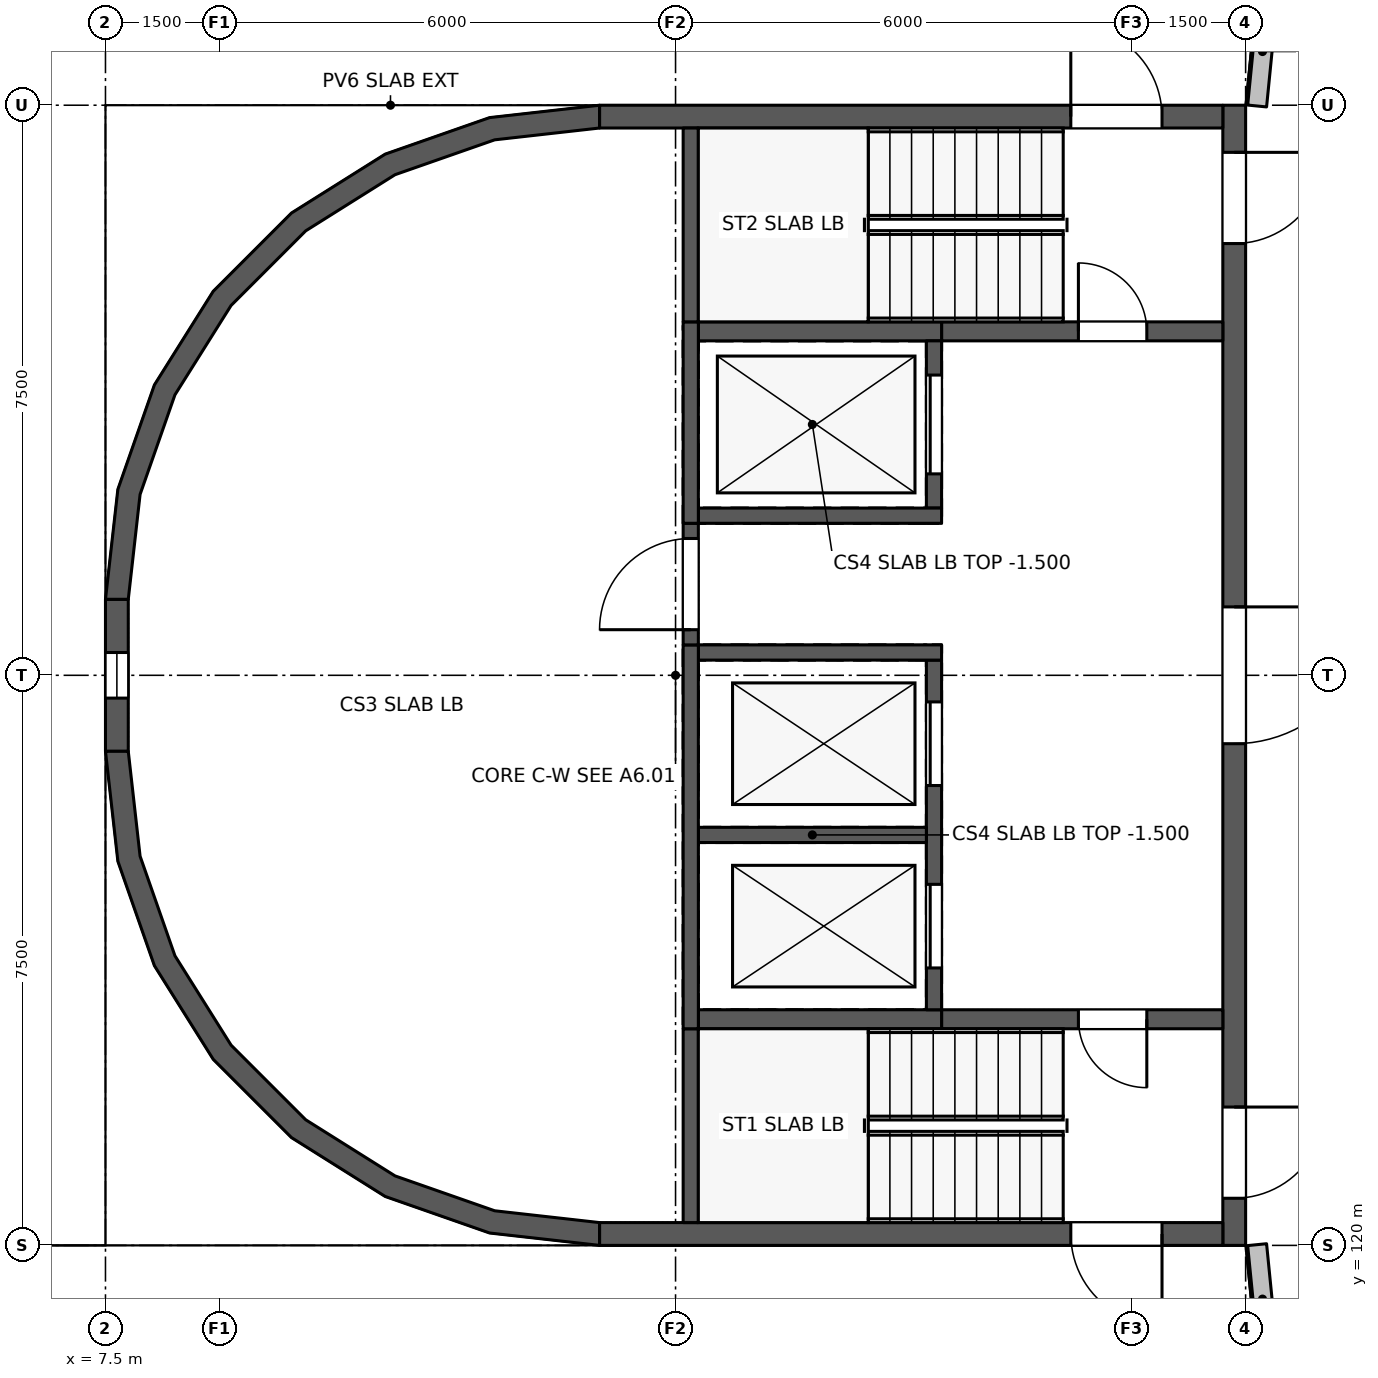
"""IFC4 building model, lengths in metres.
Left out: names, types, materials, properties, quantities, classifications, styles, units other than length and angle.
Written with IfcOpenShell. Run it as: python <this file> out.ifc"""

import sys

from ifc_helpers import new_model, si_unit, direction, frame, frame_2d, origin, place, context, subcontext, project, spatial, polyline, rectangle, outline, extrude, element, fill, save


model = new_model("IFC4")
c1 = context("Model", 3, precision=1e-05, world=origin(), true_north=direction((0.0, 1.0)))
c2 = subcontext(c1, "Body", "Model", "MODEL_VIEW")
j1 = project(units=[si_unit("LENGTHUNIT", "METRE"), si_unit("PLANEANGLEUNIT", "RADIAN")], contexts=[c1])
p1 = place(None, origin())
s1 = spatial("IfcSite", under=j1, at=p1, CompositionType="ELEMENT")
p2 = place(p1, origin())
s2 = spatial("IfcBuilding", under=s1, at=p2, CompositionType="ELEMENT")
p3 = place(p2, origin())
s3 = spatial("IfcBuildingStorey", under=s2, at=p3, CompositionType="ELEMENT", Elevation=0.0)
p4 = place(p3, frame((22.793, 136.423, 0.0), z_axis=(0.0, 0.0, 1.0), x_axis=(-0.098647801521, -0.995122410186, 0.0)))
e1 = element("IfcWall", 1, at=p4, inside=s3, PredefinedType="SOLIDWALL", context=c2, shape_type="SweptSolid", body=[
    extrude(rectangle(XDim=1.44, YDim=0.25, at=frame_2d((0.72, 0.0))), origin(), (0.0, 0.0, 1.0), 1.1),
])
p5 = place(p3, frame((22.651, 120.01, 0.0), z_axis=(0.0, 0.0, 1.0), x_axis=(0.098664443357, -0.995120760319, 0.0)))
e2 = element("IfcWall", 2, at=p5, inside=s3, PredefinedType="SOLIDWALL", context=c2, shape_type="SweptSolid", body=[
    extrude(rectangle(XDim=1.44, YDim=0.25, at=frame_2d((0.72, 0.0))), origin(), (0.0, 0.0, 1.0), 1.1),
])
p6 = place(p3, frame((22.35, 135.0, 0.0), z_axis=(0.0, 0.0, 1.0), x_axis=(0.0, -1.0, 0.0)))
e3 = element("IfcWall", 3, at=p6, inside=s3, PredefinedType="SHEAR", context=c2, shape_type="SweptSolid", body=[
    extrude(rectangle(XDim=15.0, YDim=0.3, at=frame_2d((7.5, 0.0))), origin(), (0.0, 0.0, 1.0), 3.3),
])
p7 = place(p6, frame((13.18, 0.0, 0.0)))
e4 = element("IfcOpeningElement", 4, at=p7, cuts=e3, PredefinedType="OPENING", context=c2, shape_type="SweptSolid", body=[
    extrude(rectangle(XDim=1.2, YDim=2.1, at=frame_2d((0.6, 1.05))), frame((0.0, 0.16, 0.0), z_axis=(0.0, -1.0, 0.0), x_axis=(1.0, 0.0, 0.0)), (0.0, 0.0, 1.0), 0.32),
])
p8 = place(p6, frame((0.62, 0.0, 0.0)))
e5 = element("IfcOpeningElement", 5, at=p8, cuts=e3, PredefinedType="OPENING", context=c2, shape_type="SweptSolid", body=[
    extrude(rectangle(XDim=1.2, YDim=2.1, at=frame_2d((0.6, 1.05))), frame((0.0, 0.16, 0.0), z_axis=(0.0, -1.0, 0.0), x_axis=(1.0, 0.0, 0.0)), (0.0, 0.0, 1.0), 0.32),
])
p9 = place(p6, frame((6.6, 0.0, 0.0)))
e6 = element("IfcOpeningElement", 6, at=p9, cuts=e3, PredefinedType="OPENING", context=c2, shape_type="SweptSolid", body=[
    extrude(rectangle(XDim=1.8, YDim=2.1, at=frame_2d((0.9, 1.05))), frame((0.0, 0.16, 0.0), z_axis=(0.0, -1.0, 0.0), x_axis=(1.0, 0.0, 0.0)), (0.0, 0.0, 1.0), 0.32),
])
p10 = place(p3, frame((7.65, 126.5, 0.0), z_axis=(0.0, 0.0, 1.0), x_axis=(0.0, 1.0, 0.0)))
e7 = element("IfcWall", 7, at=p10, inside=s3, PredefinedType="SHEAR", context=c2, shape_type="SweptSolid", body=[
    extrude(rectangle(XDim=2.0, YDim=0.3, at=frame_2d((1.0, 0.0))), origin(), (0.0, 0.0, 1.0), 3.3),
])
p11 = place(p10, frame((0.7, 0.0, 0.3)))
e8 = element("IfcOpeningElement", 8, at=p11, cuts=e7, PredefinedType="OPENING", context=c2, shape_type="SweptSolid", body=[
    extrude(rectangle(XDim=0.6, YDim=2.7, at=frame_2d((0.3, 1.35))), frame((0.0, 0.16, 0.0), z_axis=(0.0, -1.0, 0.0), x_axis=(1.0, 0.0, 0.0)), (0.0, 0.0, 1.0), 0.32),
])
p12 = place(p3, frame((22.2, 120.15, 0.0), z_axis=(0.0, 0.0, 1.0), x_axis=(-1.0, 0.0, 0.0)))
e9 = element("IfcWall", 9, at=p12, inside=s3, PredefinedType="SHEAR", context=c2, shape_type="SweptSolid", body=[
    extrude(rectangle(XDim=8.2, YDim=0.3, at=frame_2d((4.1, 0.0))), origin(), (0.0, 0.0, 1.0), 3.3),
])
p13 = place(p12, frame((0.8, 0.0, 0.0)))
e10 = element("IfcOpeningElement", 10, at=p13, cuts=e9, PredefinedType="OPENING", context=c2, shape_type="SweptSolid", body=[
    extrude(rectangle(XDim=1.2, YDim=2.1, at=frame_2d((0.6, 1.05))), frame((0.0, 0.16, 0.0), z_axis=(0.0, -1.0, 0.0), x_axis=(1.0, 0.0, 0.0)), (0.0, 0.0, 1.0), 0.32),
])
p14 = place(p3, frame((14.0, 134.85, 0.0), z_axis=(0.0, 0.0, 1.0), x_axis=(1.0, 0.0, 0.0)))
e11 = element("IfcWall", 11, at=p14, inside=s3, PredefinedType="SHEAR", context=c2, shape_type="SweptSolid", body=[
    extrude(rectangle(XDim=8.2, YDim=0.3, at=frame_2d((4.1, 0.0))), origin(), (0.0, 0.0, 1.0), 3.3),
])
p15 = place(p14, frame((6.2, 0.0, 0.0)))
e12 = element("IfcOpeningElement", 12, at=p15, cuts=e11, PredefinedType="OPENING", context=c2, shape_type="SweptSolid", body=[
    extrude(rectangle(XDim=1.2, YDim=2.1, at=frame_2d((0.6, 1.05))), frame((0.0, 0.16, 0.0), z_axis=(0.0, -1.0, 0.0), x_axis=(1.0, 0.0, 0.0)), (0.0, 0.0, 1.0), 0.32),
])
p16 = place(p3, frame((22.2, 122.975, 0.0), z_axis=(0.0, 0.0, 1.0), x_axis=(-1.0, 0.0, 0.0)))
e13 = element("IfcWall", 13, at=p16, inside=s3, PredefinedType="STANDARD", context=c2, shape_type="SweptSolid", body=[
    extrude(rectangle(XDim=3.7, YDim=0.25, at=frame_2d((1.85, 0.0))), origin(), (0.0, 0.0, 1.0), 3.1),
])
p17 = place(p16, frame((1.0, 0.0, 0.0)))
e14 = element("IfcOpeningElement", 14, at=p17, cuts=e13, PredefinedType="OPENING", context=c2, shape_type="SweptSolid", body=[
    extrude(rectangle(XDim=0.9, YDim=2.1, at=frame_2d((0.45, 1.05))), frame((0.0, 0.135, 0.0), z_axis=(0.0, -1.0, 0.0), x_axis=(1.0, 0.0, 0.0)), (0.0, 0.0, 1.0), 0.27),
])
p18 = place(p3, frame((18.5, 122.975, 0.0), z_axis=(0.0, 0.0, 1.0), x_axis=(-1.0, 0.0, 0.0)))
e15 = element("IfcWall", 15, at=p18, inside=s3, PredefinedType="STANDARD", context=c2, shape_type="SweptSolid", body=[
    extrude(rectangle(XDim=3.2, YDim=0.25, at=frame_2d((1.6, 0.0))), origin(), (0.0, 0.0, 1.0), 3.1),
])
p19 = place(p3, frame((18.5, 132.025, 0.0), z_axis=(0.0, 0.0, 1.0), x_axis=(1.0, 0.0, 0.0)))
e16 = element("IfcWall", 16, at=p19, inside=s3, PredefinedType="STANDARD", context=c2, shape_type="SweptSolid", body=[
    extrude(rectangle(XDim=3.7, YDim=0.25, at=frame_2d((1.85, 0.0))), origin(), (0.0, 0.0, 1.0), 3.1),
])
p20 = place(p19, frame((1.8, 0.0, 0.0)))
e17 = element("IfcOpeningElement", 17, at=p20, cuts=e16, PredefinedType="OPENING", context=c2, shape_type="SweptSolid", body=[
    extrude(rectangle(XDim=0.9, YDim=2.1, at=frame_2d((0.45, 1.05))), frame((0.0, 0.135, 0.0), z_axis=(0.0, -1.0, 0.0), x_axis=(1.0, 0.0, 0.0)), (0.0, 0.0, 1.0), 0.27),
])
p21 = place(p3, frame((18.5, 132.025, 0.0), z_axis=(0.0, 0.0, 1.0), x_axis=(-1.0, 0.0, 0.0)))
e18 = element("IfcWall", 18, at=p21, inside=s3, PredefinedType="STANDARD", context=c2, shape_type="SweptSolid", body=[
    extrude(rectangle(XDim=3.2, YDim=0.25, at=frame_2d((1.6, 0.0))), origin(), (0.0, 0.0, 1.0), 3.1),
])
p22 = place(p3, frame((18.4, 123.1, 0.0), z_axis=(0.0, 0.0, 1.0), x_axis=(0.0, 1.0, 0.0)))
e19 = element("IfcWall", 19, at=p22, inside=s3, PredefinedType="STANDARD", context=c2, shape_type="SweptSolid", body=[
    extrude(rectangle(XDim=4.6, YDim=0.2, at=frame_2d((2.3, 0.0))), origin(), (0.0, 0.0, 1.0), 3.1),
])
p23 = place(p22, frame((0.55, 0.0, 0.0)))
e20 = element("IfcOpeningElement", 20, at=p23, cuts=e19, PredefinedType="OPENING", context=c2, shape_type="SweptSolid", body=[
    extrude(rectangle(XDim=1.1, YDim=2.1, at=frame_2d((0.55, 1.05))), frame((0.0, 0.11, 0.0), z_axis=(0.0, -1.0, 0.0), x_axis=(1.0, 0.0, 0.0)), (0.0, 0.0, 1.0), 0.22),
])
p24 = place(p22, frame((2.95, 0.0, 0.0)))
e21 = element("IfcOpeningElement", 21, at=p24, cuts=e19, PredefinedType="OPENING", context=c2, shape_type="SweptSolid", body=[
    extrude(rectangle(XDim=1.1, YDim=2.1, at=frame_2d((0.55, 1.05))), frame((0.0, 0.11, 0.0), z_axis=(0.0, -1.0, 0.0), x_axis=(1.0, 0.0, 0.0)), (0.0, 0.0, 1.0), 0.22),
])
p25 = place(p3, frame((18.4, 129.7, 0.0), z_axis=(0.0, 0.0, 1.0), x_axis=(0.0, 1.0, 0.0)))
e22 = element("IfcWall", 22, at=p25, inside=s3, PredefinedType="STANDARD", context=c2, shape_type="SweptSolid", body=[
    extrude(rectangle(XDim=2.2, YDim=0.2, at=frame_2d((1.1, 0.0))), origin(), (0.0, 0.0, 1.0), 3.1),
])
p26 = place(p25, frame((0.45, 0.0, 0.0)))
e23 = element("IfcOpeningElement", 23, at=p26, cuts=e22, PredefinedType="OPENING", context=c2, shape_type="SweptSolid", body=[
    extrude(rectangle(XDim=1.3, YDim=2.1, at=frame_2d((0.65, 1.05))), frame((0.0, 0.11, 0.0), z_axis=(0.0, -1.0, 0.0), x_axis=(1.0, 0.0, 0.0)), (0.0, 0.0, 1.0), 0.22),
])
p27 = place(p3, frame((18.3, 125.4, 0.0), z_axis=(0.0, 0.0, 1.0), x_axis=(-1.0, 0.0, 0.0)))
e24 = element("IfcWall", 24, at=p27, inside=s3, PredefinedType="STANDARD", context=c2, shape_type="SweptSolid", body=[
    extrude(rectangle(XDim=3.0, YDim=0.2, at=frame_2d((1.5, 0.0))), origin(), (0.0, 0.0, 1.0), 3.1),
])
for number, where, z_axis, x_axis in (
    (25, (18.5, 127.8, 0.0), (0.0, 0.0, 1.0), (-1.0, 0.0, 0.0)),
    (26, (18.5, 129.6, 0.0), (0.0, 0.0, 1.0), (-1.0, 0.0, 0.0)),
):
    element("IfcWall", number, at=place(p3, frame(where, z_axis=z_axis, x_axis=x_axis)), inside=s3, PredefinedType="STANDARD", context=c2, shape_type="SweptSolid", body=[
        extrude(rectangle(XDim=3.2, YDim=0.2, at=frame_2d((1.6, 0.0))), origin(), (0.0, 0.0, 1.0), 3.1),
    ])
p28 = place(p3, frame((15.2, 120.3, 0.0), z_axis=(0.0, 0.0, 1.0), x_axis=(0.0, 1.0, 0.0)))
e27 = element("IfcWall", 27, at=p28, inside=s3, PredefinedType="STANDARD", context=c2, shape_type="SweptSolid", body=[
    extrude(rectangle(XDim=2.55, YDim=0.2, at=frame_2d((1.275, 0.0))), origin(), (0.0, 0.0, 1.0), 3.1),
])
p29 = place(p3, frame((15.2, 122.85, 0.0), z_axis=(0.0, 0.0, 1.0), x_axis=(0.0, 1.0, 0.0)))
e28 = element("IfcWall", 28, at=p29, inside=s3, PredefinedType="STANDARD", context=c2, shape_type="SweptSolid", body=[
    extrude(rectangle(XDim=5.05, YDim=0.2, at=frame_2d((2.525, 0.0))), origin(), (0.0, 0.0, 1.0), 3.1),
])
p30 = place(p3, frame((15.2, 127.9, 0.0), z_axis=(0.0, 0.0, 1.0), x_axis=(0.0, 1.0, 0.0)))
e29 = element("IfcWall", 29, at=p30, inside=s3, PredefinedType="STANDARD", context=c2, shape_type="SweptSolid", body=[
    extrude(rectangle(XDim=1.6, YDim=0.2, at=frame_2d((0.8, 0.0))), origin(), (0.0, 0.0, 1.0), 3.1),
])
p31 = place(p30, frame((0.2, 0.0, 0.0)))
e30 = element("IfcOpeningElement", 30, at=p31, cuts=e29, PredefinedType="OPENING", context=c2, shape_type="SweptSolid", body=[
    extrude(rectangle(XDim=1.2, YDim=2.1, at=frame_2d((0.6, 1.05))), frame((0.0, 0.11, 0.0), z_axis=(0.0, -1.0, 0.0), x_axis=(1.0, 0.0, 0.0)), (0.0, 0.0, 1.0), 0.22),
])
p32 = place(p3, frame((15.2, 129.5, 0.0), z_axis=(0.0, 0.0, 1.0), x_axis=(0.0, 1.0, 0.0)))
e31 = element("IfcWall", 31, at=p32, inside=s3, PredefinedType="STANDARD", context=c2, shape_type="SweptSolid", body=[
    extrude(rectangle(XDim=2.65, YDim=0.2, at=frame_2d((1.325, 0.0))), origin(), (0.0, 0.0, 1.0), 3.1),
])
p33 = place(p3, frame((15.2, 132.15, 0.0), z_axis=(0.0, 0.0, 1.0), x_axis=(0.0, 1.0, 0.0)))
e32 = element("IfcWall", 32, at=p33, inside=s3, PredefinedType="STANDARD", context=c2, shape_type="SweptSolid", body=[
    extrude(rectangle(XDim=2.55, YDim=0.2, at=frame_2d((1.275, 0.0))), origin(), (0.0, 0.0, 1.0), 3.1),
])
p34 = place(p3, origin())
e33 = element("IfcWall", 33, at=p34, inside=s3, PredefinedType="SHEAR", context=c2, shape_type="SweptSolid", body=[
    extrude(outline(polyline([(14.0, 120.0), (12.554, 120.163), (11.18, 120.644), (9.947, 121.418), (8.918, 122.447), (8.144, 123.68), (7.663, 125.054), (7.5, 126.5), (7.8, 126.5), (7.955, 125.12), (8.414, 123.81), (9.153, 122.635), (10.135, 121.653), (11.31, 120.914), (12.62, 120.455), (14.0, 120.3), (14.0, 120.0)])), origin(), (0.0, 0.0, 1.0), 3.3),
])
p35 = place(p3, origin())
e34 = element("IfcWall", 34, at=p35, inside=s3, PredefinedType="SHEAR", context=c2, shape_type="SweptSolid", body=[
    extrude(outline(polyline([(14.0, 135.0), (12.554, 134.837), (11.18, 134.356), (9.947, 133.582), (8.918, 132.553), (8.144, 131.32), (7.663, 129.946), (7.5, 128.5), (7.8, 128.5), (7.955, 129.88), (8.414, 131.19), (9.153, 132.365), (10.135, 133.347), (11.31, 134.086), (12.62, 134.545), (14.0, 134.7), (14.0, 135.0)])), origin(), (0.0, 0.0, 1.0), 3.3),
])
p36 = place(p3, frame((18.4, 122.9, -1.5), z_axis=(0.0, 0.0, 1.0), x_axis=(0.0, 1.0, 0.0)))
e35 = element("IfcWall", 35, at=p36, inside=s3, PredefinedType="STANDARD", context=c2, shape_type="SweptSolid", body=[
    extrude(rectangle(XDim=5.0, YDim=0.2, at=frame_2d((2.5, 0.0))), origin(), (0.0, 0.0, 1.0), 1.3),
])
for number, where, z_axis, x_axis in (
    (36, (18.3, 123.0, -1.5), (0.0, 0.0, 1.0), (-1.0, 0.0, 0.0)),
    (37, (18.3, 125.4, -1.5), (0.0, 0.0, 1.0), (-1.0, 0.0, 0.0)),
    (38, (18.3, 127.8, -1.5), (0.0, 0.0, 1.0), (-1.0, 0.0, 0.0)),
):
    element("IfcWall", number, at=place(p3, frame(where, z_axis=z_axis, x_axis=x_axis)), inside=s3, PredefinedType="STANDARD", context=c2, shape_type="SweptSolid", body=[
        extrude(rectangle(XDim=3.0, YDim=0.2, at=frame_2d((1.5, 0.0))), origin(), (0.0, 0.0, 1.0), 1.3),
    ])
p37 = place(p3, frame((15.2, 122.9, -1.5), z_axis=(0.0, 0.0, 1.0), x_axis=(0.0, 1.0, 0.0)))
e39 = element("IfcWall", 39, at=p37, inside=s3, PredefinedType="STANDARD", context=c2, shape_type="SweptSolid", body=[
    extrude(rectangle(XDim=5.0, YDim=0.2, at=frame_2d((2.5, 0.0))), origin(), (0.0, 0.0, 1.0), 1.3),
])
p38 = place(p3, frame((18.4, 129.5, -1.5), z_axis=(0.0, 0.0, 1.0), x_axis=(0.0, 1.0, 0.0)))
e40 = element("IfcWall", 40, at=p38, inside=s3, PredefinedType="STANDARD", context=c2, shape_type="SweptSolid", body=[
    extrude(rectangle(XDim=2.6, YDim=0.2, at=frame_2d((1.3, 0.0))), origin(), (0.0, 0.0, 1.0), 1.3),
])
for number, where, z_axis, x_axis in (
    (41, (18.3, 129.6, -1.5), (0.0, 0.0, 1.0), (-1.0, 0.0, 0.0)),
    (42, (18.3, 132.0, -1.5), (0.0, 0.0, 1.0), (-1.0, 0.0, 0.0)),
):
    element("IfcWall", number, at=place(p3, frame(where, z_axis=z_axis, x_axis=x_axis)), inside=s3, PredefinedType="STANDARD", context=c2, shape_type="SweptSolid", body=[
        extrude(rectangle(XDim=3.0, YDim=0.2, at=frame_2d((1.5, 0.0))), origin(), (0.0, 0.0, 1.0), 1.3),
    ])
p39 = place(p3, frame((15.2, 129.5, -1.5), z_axis=(0.0, 0.0, 1.0), x_axis=(0.0, 1.0, 0.0)))
e43 = element("IfcWall", 43, at=p39, inside=s3, PredefinedType="STANDARD", context=c2, shape_type="SweptSolid", body=[
    extrude(rectangle(XDim=2.6, YDim=0.2, at=frame_2d((1.3, 0.0))), origin(), (0.0, 0.0, 1.0), 1.3),
])
p40 = place(p7, origin())
e44 = element("IfcDoor", 44, at=p40, inside=s3, OperationType="SINGLE_SWING_RIGHT", PredefinedType="DOOR", context=c2, shape_type="SweptSolid", body=[
    extrude(rectangle(XDim=1.2, YDim=2.1, at=frame_2d((0.6, 1.05))), frame((0.0, 0.025, 0.0), z_axis=(0.0, -1.0, 0.0), x_axis=(1.0, 0.0, 0.0)), (0.0, 0.0, 1.0), 0.05),
])
fill(e4, e44)
p41 = place(p8, origin())
e45 = element("IfcDoor", 45, at=p41, inside=s3, OperationType="SINGLE_SWING_LEFT", PredefinedType="DOOR", context=c2, shape_type="SweptSolid", body=[
    extrude(rectangle(XDim=1.2, YDim=2.1, at=frame_2d((0.6, 1.05))), frame((0.0, 0.025, 0.0), z_axis=(0.0, -1.0, 0.0), x_axis=(1.0, 0.0, 0.0)), (0.0, 0.0, 1.0), 0.05),
])
fill(e5, e45)
p42 = place(p9, origin())
e46 = element("IfcDoor", 46, at=p42, inside=s3, OperationType="DOUBLE_DOOR_SINGLE_SWING", PredefinedType="DOOR", context=c2, shape_type="SweptSolid", body=[
    extrude(rectangle(XDim=1.8, YDim=2.1, at=frame_2d((0.9, 1.05))), frame((0.0, 0.025, 0.0), z_axis=(0.0, -1.0, 0.0), x_axis=(1.0, 0.0, 0.0)), (0.0, 0.0, 1.0), 0.05),
])
fill(e6, e46)
p43 = place(p17, origin())
e47 = element("IfcDoor", 47, at=p43, inside=s3, OperationType="SINGLE_SWING_LEFT", PredefinedType="DOOR", context=c2, shape_type="SweptSolid", body=[
    extrude(rectangle(XDim=0.9, YDim=2.1, at=frame_2d((0.45, 1.05))), frame((0.0, 0.025, 0.0), z_axis=(0.0, -1.0, 0.0), x_axis=(1.0, 0.0, 0.0)), (0.0, 0.0, 1.0), 0.05),
])
fill(e14, e47)
p44 = place(p20, origin())
e48 = element("IfcDoor", 48, at=p44, inside=s3, OperationType="SINGLE_SWING_RIGHT", PredefinedType="DOOR", context=c2, shape_type="SweptSolid", body=[
    extrude(rectangle(XDim=0.9, YDim=2.1, at=frame_2d((0.45, 1.05))), frame((0.0, 0.025, 0.0), z_axis=(0.0, -1.0, 0.0), x_axis=(1.0, 0.0, 0.0)), (0.0, 0.0, 1.0), 0.05),
])
fill(e17, e48)
p45 = place(p23, origin())
e49 = element("IfcDoor", 49, at=p45, inside=s3, OperationType="DOUBLE_DOOR_SLIDING", PredefinedType="DOOR", context=c2, shape_type="SweptSolid", body=[
    extrude(rectangle(XDim=1.1, YDim=2.1, at=frame_2d((0.55, 1.05))), frame((0.0, 0.025, 0.0), z_axis=(0.0, -1.0, 0.0), x_axis=(1.0, 0.0, 0.0)), (0.0, 0.0, 1.0), 0.05),
])
fill(e20, e49)
p46 = place(p24, origin())
e50 = element("IfcDoor", 50, at=p46, inside=s3, OperationType="DOUBLE_DOOR_SLIDING", PredefinedType="DOOR", context=c2, shape_type="SweptSolid", body=[
    extrude(rectangle(XDim=1.1, YDim=2.1, at=frame_2d((0.55, 1.05))), frame((0.0, 0.025, 0.0), z_axis=(0.0, -1.0, 0.0), x_axis=(1.0, 0.0, 0.0)), (0.0, 0.0, 1.0), 0.05),
])
fill(e21, e50)
p47 = place(p26, origin())
e51 = element("IfcDoor", 51, at=p47, inside=s3, OperationType="DOUBLE_DOOR_SLIDING", PredefinedType="DOOR", context=c2, shape_type="SweptSolid", body=[
    extrude(rectangle(XDim=1.3, YDim=2.1, at=frame_2d((0.65, 1.05))), frame((0.0, 0.025, 0.0), z_axis=(0.0, -1.0, 0.0), x_axis=(1.0, 0.0, 0.0)), (0.0, 0.0, 1.0), 0.05),
])
fill(e23, e51)
p48 = place(p31, origin())
e52 = element("IfcDoor", 52, at=p48, inside=s3, OperationType="SINGLE_SWING_RIGHT", PredefinedType="DOOR", context=c2, shape_type="SweptSolid", body=[
    extrude(rectangle(XDim=1.2, YDim=2.1, at=frame_2d((0.6, 1.05))), frame((0.0, 0.025, 0.0), z_axis=(0.0, -1.0, 0.0), x_axis=(1.0, 0.0, 0.0)), (0.0, 0.0, 1.0), 0.05),
])
fill(e30, e52)
p49 = place(p13, origin())
e53 = element("IfcDoor", 53, at=p49, inside=s3, OperationType="SINGLE_SWING_RIGHT", PredefinedType="DOOR", context=c2, shape_type="SweptSolid", body=[
    extrude(rectangle(XDim=1.2, YDim=2.1, at=frame_2d((0.6, 1.05))), frame((0.0, 0.025, 0.0), z_axis=(0.0, -1.0, 0.0), x_axis=(1.0, 0.0, 0.0)), (0.0, 0.0, 1.0), 0.05),
])
fill(e10, e53)
p50 = place(p15, origin())
e54 = element("IfcDoor", 54, at=p50, inside=s3, OperationType="SINGLE_SWING_RIGHT", PredefinedType="DOOR", context=c2, shape_type="SweptSolid", body=[
    extrude(rectangle(XDim=1.2, YDim=2.1, at=frame_2d((0.6, 1.05))), frame((0.0, 0.025, 0.0), z_axis=(0.0, -1.0, 0.0), x_axis=(1.0, 0.0, 0.0)), (0.0, 0.0, 1.0), 0.05),
])
fill(e12, e54)
p51 = place(p11, origin())
e55 = element("IfcWindow", 55, at=p51, inside=s3, PartitioningType="SINGLE_PANEL", PredefinedType="WINDOW", context=c2, shape_type="SweptSolid", body=[
    extrude(rectangle(XDim=0.6, YDim=2.7, at=frame_2d((0.3, 1.35))), frame((0.0, 0.03, 0.0), z_axis=(0.0, -1.0, 0.0), x_axis=(1.0, 0.0, 0.0)), (0.0, 0.0, 1.0), 0.06),
])
fill(e8, e55)
save(model, sys.argv[1])
